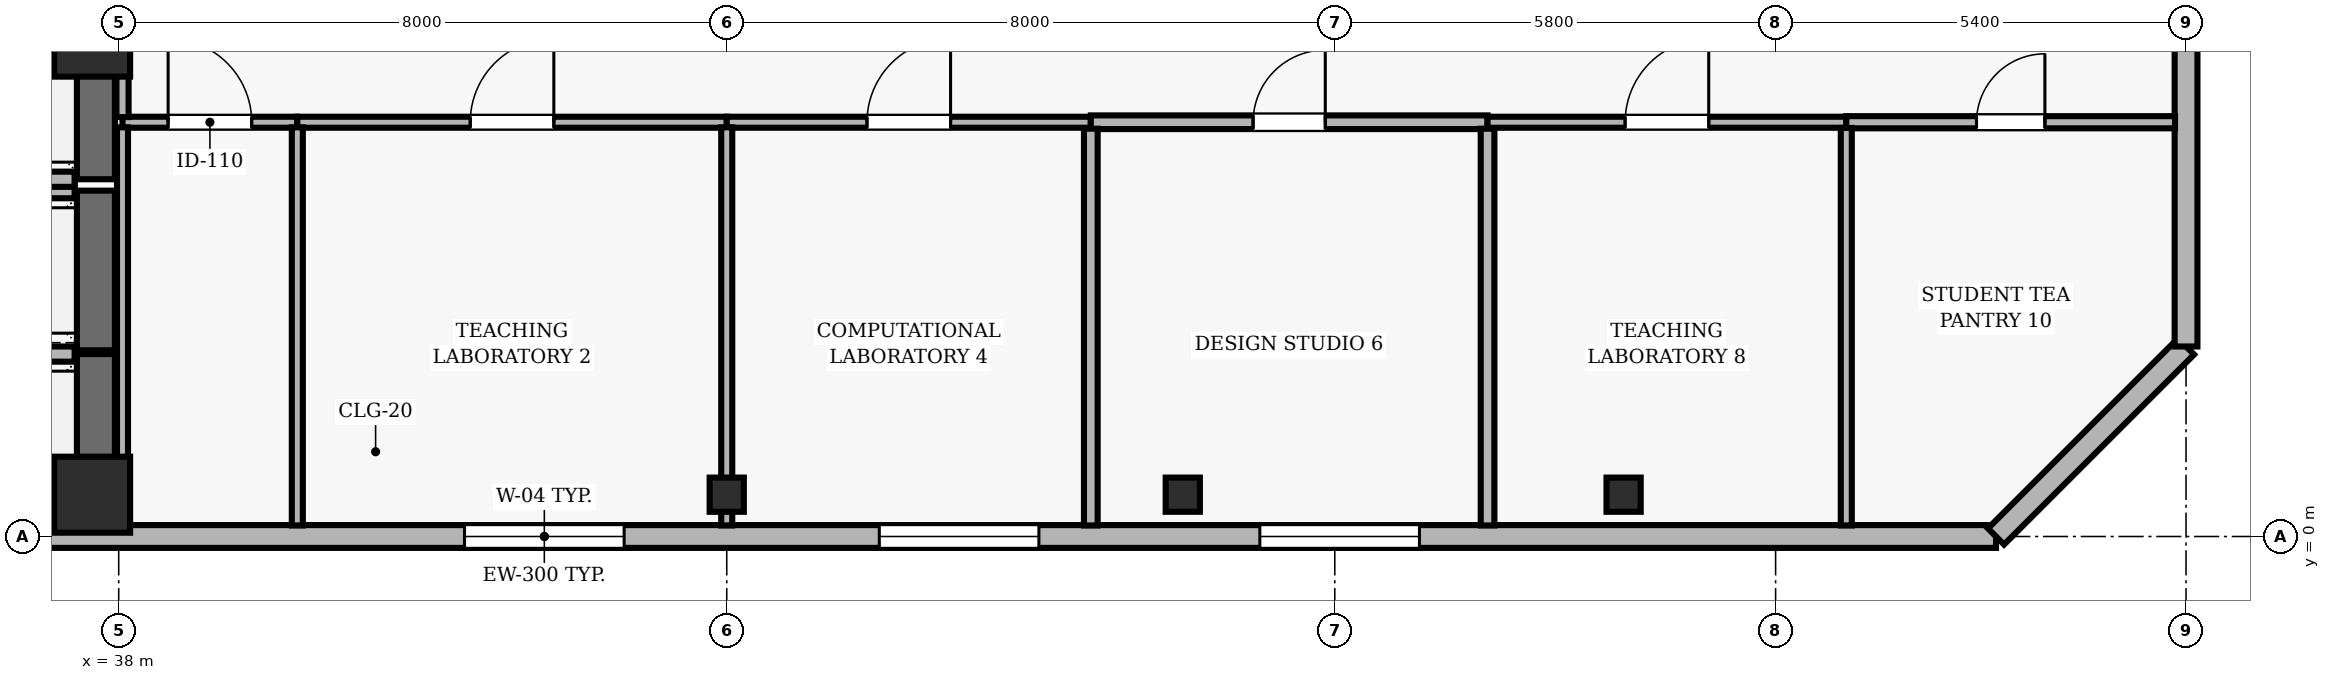
"""IFC4 building model, lengths in metres.
Left out: names, types, materials, properties, quantities, classifications, styles, units other than length and angle.
Written with IfcOpenShell. Run it as: python <this file> out.ifc"""

import sys

from ifc_helpers import new_model, si_unit, direction, frame, frame_2d, origin, origin_2d, place, context, subcontext, project, spatial, rectangle, hollow_rectangle, extrude, element, fill, save


model = new_model("IFC4")
c1 = context("Model", 3, precision=1e-05, world=origin(), true_north=direction((0.0, 1.0)))
c2 = subcontext(c1, "Body", "Model", "MODEL_VIEW")
j1 = project(units=[si_unit("LENGTHUNIT", "METRE"), si_unit("PLANEANGLEUNIT", "RADIAN")], contexts=[c1])
p1 = place(None, origin())
s1 = spatial("IfcSite", under=j1, at=p1, CompositionType="ELEMENT")
p2 = place(p1, origin())
s2 = spatial("IfcBuilding", under=s1, at=p2, CompositionType="ELEMENT")
p3 = place(p2, frame((0.0, 0.0, 210.9)))
s3 = spatial("IfcBuildingStorey", under=s2, at=p3, CompositionType="ELEMENT", Elevation=210.9)
for number, where, z_axis, x_axis in (
    (1, (37.65, 0.55, 0.0), (0.0, 0.0, 1.0), (1.0, 0.0, 0.0)),
    (2, (37.65, 6.55, 0.0), (0.0, 0.0, 1.0), (1.0, 0.0, 0.0)),
):
    element("IfcColumn", number, at=place(p3, frame(where, z_axis=z_axis, x_axis=x_axis)), inside=s3, PredefinedType="COLUMN", context=c2, shape_type="SweptSolid", body=[
        extrude(rectangle(XDim=1.0, YDim=1.0, at=origin_2d()), origin(), (0.0, 0.0, 1.0), 3.9),
    ])
for number, where, z_axis, x_axis in (
    (3, (46.0, 0.55, 0.0), (0.0, 0.0, 1.0), (1.0, 0.0, 0.0)),
    (4, (52.0, 0.55, 0.0), (0.0, 0.0, 1.0), (1.0, 0.0, 0.0)),
    (5, (57.8, 0.55, 0.0), (0.0, 0.0, 1.0), (1.0, 0.0, 0.0)),
):
    element("IfcColumn", number, at=place(p3, frame(where, z_axis=z_axis, x_axis=x_axis)), inside=s3, PredefinedType="COLUMN", context=c2, shape_type="SweptSolid", body=[
        extrude(hollow_rectangle(XDim=0.45, YDim=0.45, WallThickness=0.02, at=origin_2d()), origin(), (0.0, 0.0, 1.0), 3.9),
    ])
p4 = place(p3, frame((24.5, 0.0, 0.0), z_axis=(0.0, 0.0, 1.0), x_axis=(1.0, 0.0, 0.0)))
e6 = element("IfcWall", 6, at=p4, inside=s3, PredefinedType="SOLIDWALL", context=c2, shape_type="SweptSolid", body=[
    extrude(rectangle(XDim=38.2, YDim=0.3, at=frame_2d((19.1, 0.0))), origin(), (0.0, 0.0, 1.0), 3.69),
])
p5 = place(p4, frame((1.679, 0.0, 0.9)))
e7 = element("IfcOpeningElement", 7, at=p5, cuts=e6, PredefinedType="OPENING", context=c2, shape_type="SweptSolid", body=[
    extrude(rectangle(XDim=2.1, YDim=1.6, at=frame_2d((1.05, 0.8))), frame((0.0, 0.16, 0.0), z_axis=(0.0, -1.0, 0.0), x_axis=(1.0, 0.0, 0.0)), (0.0, 0.0, 1.0), 0.32),
])
p6 = place(p4, frame((18.05, 0.0, 0.9)))
e8 = element("IfcOpeningElement", 8, at=p6, cuts=e6, PredefinedType="OPENING", context=c2, shape_type="SweptSolid", body=[
    extrude(rectangle(XDim=2.1, YDim=1.6, at=frame_2d((1.05, 0.8))), frame((0.0, 0.16, 0.0), z_axis=(0.0, -1.0, 0.0), x_axis=(1.0, 0.0, 0.0)), (0.0, 0.0, 1.0), 0.32),
])
p7 = place(p4, frame((23.507, 0.0, 0.9)))
e9 = element("IfcOpeningElement", 9, at=p7, cuts=e6, PredefinedType="OPENING", context=c2, shape_type="SweptSolid", body=[
    extrude(rectangle(XDim=2.1, YDim=1.6, at=frame_2d((1.05, 0.8))), frame((0.0, 0.16, 0.0), z_axis=(0.0, -1.0, 0.0), x_axis=(1.0, 0.0, 0.0)), (0.0, 0.0, 1.0), 0.32),
])
p8 = place(p4, frame((28.514, 0.0, 0.9)))
e10 = element("IfcOpeningElement", 10, at=p8, cuts=e6, PredefinedType="OPENING", context=c2, shape_type="SweptSolid", body=[
    extrude(rectangle(XDim=2.1, YDim=1.6, at=frame_2d((1.05, 0.8))), frame((0.0, 0.16, 0.0), z_axis=(0.0, -1.0, 0.0), x_axis=(1.0, 0.0, 0.0)), (0.0, 0.0, 1.0), 0.32),
])
p9 = place(p3, frame((62.7, 0.0, 0.0), z_axis=(0.0, 0.0, 1.0), x_axis=(0.707106781187, 0.707106781187, 0.0)))
e11 = element("IfcWall", 11, at=p9, inside=s3, PredefinedType="SOLIDWALL", context=c2, shape_type="SweptSolid", body=[
    extrude(rectangle(XDim=3.536, YDim=0.3, at=frame_2d((1.768, 0.0))), origin(), (0.0, 0.0, 1.0), 3.69),
])
p10 = place(p3, frame((65.2, 2.5, 0.0), z_axis=(0.0, 0.0, 1.0), x_axis=(0.0, 1.0, 0.0)))
e12 = element("IfcWall", 12, at=p10, inside=s3, PredefinedType="SOLIDWALL", context=c2, shape_type="SweptSolid", body=[
    extrude(rectangle(XDim=11.0, YDim=0.3, at=frame_2d((5.5, 0.0))), origin(), (0.0, 0.0, 1.0), 3.69),
])
p11 = place(p10, frame((7.5, 0.0, 0.9)))
e13 = element("IfcOpeningElement", 13, at=p11, cuts=e12, PredefinedType="OPENING", context=c2, shape_type="SweptSolid", body=[
    extrude(rectangle(XDim=1.5, YDim=1.8, at=frame_2d((0.75, 0.9))), frame((0.0, 0.16, 0.0), z_axis=(0.0, -1.0, 0.0), x_axis=(1.0, 0.0, 0.0)), (0.0, 0.0, 1.0), 0.32),
])
p12 = place(p3, frame((37.7, 0.3, 0.0), z_axis=(0.0, 0.0, 1.0), x_axis=(0.0, 1.0, 0.0)))
e14 = element("IfcWall", 14, at=p12, inside=s3, PredefinedType="SHEAR", context=c2, shape_type="SweptSolid", body=[
    extrude(rectangle(XDim=2.1, YDim=0.5, at=frame_2d((1.05, 0.0))), origin(), (0.0, 0.0, 1.0), 3.69),
])
for number, where, z_axis, x_axis in (
    (15, (35.28, 0.3, 0.0), (0.0, 0.0, 1.0), (1.0, 0.0, 0.0)),
    (16, (37.42, 2.4, 0.0), (0.0, 0.0, 1.0), (-1.0, 0.0, 0.0)),
):
    element("IfcWall", number, at=place(p3, frame(where, z_axis=z_axis, x_axis=x_axis)), inside=s3, PredefinedType="SOLIDWALL", context=c2, shape_type="SweptSolid", body=[
        extrude(rectangle(XDim=2.14, YDim=0.2, at=frame_2d((1.07, 0.0))), origin(), (0.0, 0.0, 1.0), 3.69),
    ])
p13 = place(p3, frame((37.7, 2.45, 0.0), z_axis=(0.0, 0.0, 1.0), x_axis=(0.0, 1.0, 0.0)))
e17 = element("IfcWall", 17, at=p13, inside=s3, PredefinedType="SHEAR", context=c2, shape_type="SweptSolid", body=[
    extrude(rectangle(XDim=2.1, YDim=0.5, at=frame_2d((1.05, 0.0))), origin(), (0.0, 0.0, 1.0), 3.69),
])
p14 = place(p3, frame((37.42, 4.55, 0.0), z_axis=(0.0, 0.0, 1.0), x_axis=(-1.0, 0.0, 0.0)))
e18 = element("IfcWall", 18, at=p14, inside=s3, PredefinedType="SOLIDWALL", context=c2, shape_type="SweptSolid", body=[
    extrude(rectangle(XDim=2.14, YDim=0.2, at=frame_2d((1.07, 0.0))), origin(), (0.0, 0.0, 1.0), 3.69),
])
p15 = place(p3, frame((37.7, 4.7, 0.0), z_axis=(0.0, 0.0, 1.0), x_axis=(0.0, 1.0, 0.0)))
e19 = element("IfcWall", 19, at=p15, inside=s3, PredefinedType="SHEAR", context=c2, shape_type="SweptSolid", body=[
    extrude(rectangle(XDim=2.25, YDim=0.5, at=frame_2d((1.125, 0.0))), origin(), (0.0, 0.0, 1.0), 3.69),
])
p16 = place(p3, frame((35.28, 4.7, 0.0), z_axis=(0.0, 0.0, 1.0), x_axis=(1.0, 0.0, 0.0)))
e20 = element("IfcWall", 20, at=p16, inside=s3, PredefinedType="SOLIDWALL", context=c2, shape_type="SweptSolid", body=[
    extrude(rectangle(XDim=2.14, YDim=0.2, at=frame_2d((1.07, 0.0))), origin(), (0.0, 0.0, 1.0), 3.69),
])
p17 = place(p3, frame((38.05, 5.45, 0.0), z_axis=(0.0, 0.0, 1.0), x_axis=(1.0, 0.0, 0.0)))
e21 = element("IfcWall", 21, at=p17, inside=s3, PredefinedType="PARTITIONING", context=c2, shape_type="SweptSolid", body=[
    extrude(rectangle(XDim=2.3, YDim=0.145, at=frame_2d((1.15, 0.0))), origin(), (0.0, 0.0, 1.0), 3.372),
])
p18 = place(p17, frame((0.6, 0.0, 0.0)))
e22 = element("IfcOpeningElement", 22, at=p18, cuts=e21, PredefinedType="OPENING", context=c2, shape_type="SweptSolid", body=[
    extrude(rectangle(XDim=1.1, YDim=2.15, at=frame_2d((0.55, 1.075))), frame((0.0, 0.083, 0.0), z_axis=(0.0, -1.0, 0.0), x_axis=(1.0, 0.0, 0.0)), (0.0, 0.0, 1.0), 0.165),
])
p19 = place(p3, frame((40.35, 5.45, 0.0), z_axis=(0.0, 0.0, 1.0), x_axis=(1.0, 0.0, 0.0)))
e23 = element("IfcWall", 23, at=p19, inside=s3, PredefinedType="PARTITIONING", context=c2, shape_type="SweptSolid", body=[
    extrude(rectangle(XDim=5.65, YDim=0.145, at=frame_2d((2.825, 0.0))), origin(), (0.0, 0.0, 1.0), 3.372),
])
p20 = place(p19, frame((2.275, 0.0, 0.0)))
e24 = element("IfcOpeningElement", 24, at=p20, cuts=e23, PredefinedType="OPENING", context=c2, shape_type="SweptSolid", body=[
    extrude(rectangle(XDim=1.1, YDim=2.15, at=frame_2d((0.55, 1.075))), frame((0.0, 0.083, 0.0), z_axis=(0.0, -1.0, 0.0), x_axis=(1.0, 0.0, 0.0)), (0.0, 0.0, 1.0), 0.165),
])
p21 = place(p3, frame((46.0, 5.45, 0.0), z_axis=(0.0, 0.0, 1.0), x_axis=(1.0, 0.0, 0.0)))
e25 = element("IfcWall", 25, at=p21, inside=s3, PredefinedType="PARTITIONING", context=c2, shape_type="SweptSolid", body=[
    extrude(rectangle(XDim=4.79, YDim=0.145, at=frame_2d((2.395, 0.0))), origin(), (0.0, 0.0, 1.0), 3.372),
])
p22 = place(p21, frame((1.845, 0.0, 0.0)))
e26 = element("IfcOpeningElement", 26, at=p22, cuts=e25, PredefinedType="OPENING", context=c2, shape_type="SweptSolid", body=[
    extrude(rectangle(XDim=1.1, YDim=2.15, at=frame_2d((0.55, 1.075))), frame((0.0, 0.083, 0.0), z_axis=(0.0, -1.0, 0.0), x_axis=(1.0, 0.0, 0.0)), (0.0, 0.0, 1.0), 0.165),
])
p23 = place(p3, frame((50.79, 5.45, 0.0), z_axis=(0.0, 0.0, 1.0), x_axis=(1.0, 0.0, 0.0)))
e27 = element("IfcWall", 27, at=p23, inside=s3, PredefinedType="PARTITIONING", context=c2, shape_type="SweptSolid", body=[
    extrude(rectangle(XDim=5.22, YDim=0.18, at=frame_2d((2.61, 0.0))), origin(), (0.0, 0.0, 1.0), 3.372),
])
p24 = place(p23, frame((2.135, 0.0, 0.0)))
e28 = element("IfcOpeningElement", 28, at=p24, cuts=e27, PredefinedType="OPENING", context=c2, shape_type="SweptSolid", body=[
    extrude(rectangle(XDim=0.95, YDim=2.1, at=frame_2d((0.475, 1.05))), frame((0.0, 0.1, 0.0), z_axis=(0.0, -1.0, 0.0), x_axis=(1.0, 0.0, 0.0)), (0.0, 0.0, 1.0), 0.2),
])
p25 = place(p3, frame((56.01, 5.45, 0.0), z_axis=(0.0, 0.0, 1.0), x_axis=(1.0, 0.0, 0.0)))
e29 = element("IfcWall", 29, at=p25, inside=s3, PredefinedType="PARTITIONING", context=c2, shape_type="SweptSolid", body=[
    extrude(rectangle(XDim=4.72, YDim=0.145, at=frame_2d((2.36, 0.0))), origin(), (0.0, 0.0, 1.0), 3.372),
])
p26 = place(p25, frame((1.81, 0.0, 0.0)))
e30 = element("IfcOpeningElement", 30, at=p26, cuts=e29, PredefinedType="OPENING", context=c2, shape_type="SweptSolid", body=[
    extrude(rectangle(XDim=1.1, YDim=2.15, at=frame_2d((0.55, 1.075))), frame((0.0, 0.083, 0.0), z_axis=(0.0, -1.0, 0.0), x_axis=(1.0, 0.0, 0.0)), (0.0, 0.0, 1.0), 0.165),
])
p27 = place(p3, frame((60.73, 5.45, 0.0), z_axis=(0.0, 0.0, 1.0), x_axis=(1.0, 0.0, 0.0)))
e31 = element("IfcWall", 31, at=p27, inside=s3, PredefinedType="PARTITIONING", context=c2, shape_type="SweptSolid", body=[
    extrude(rectangle(XDim=4.325, YDim=0.16, at=frame_2d((2.163, 0.0))), origin(), (0.0, 0.0, 1.0), 3.69),
])
p28 = place(p27, frame((1.713, 0.0, 0.0)))
e32 = element("IfcOpeningElement", 32, at=p28, cuts=e31, PredefinedType="OPENING", context=c2, shape_type="SweptSolid", body=[
    extrude(rectangle(XDim=0.9, YDim=2.1, at=frame_2d((0.45, 1.05))), frame((0.0, 0.09, 0.0), z_axis=(0.0, -1.0, 0.0), x_axis=(1.0, 0.0, 0.0)), (0.0, 0.0, 1.0), 0.18),
])
p29 = place(p3, frame((38.05, 5.383, 0.0), z_axis=(0.0, 0.0, 1.0), x_axis=(0.0, -1.0, 0.0)))
e33 = element("IfcWall", 33, at=p29, inside=s3, PredefinedType="PARTITIONING", context=c2, shape_type="SweptSolid", body=[
    extrude(rectangle(XDim=5.238, YDim=0.145, at=frame_2d((2.619, 0.0))), origin(), (0.0, 0.0, 1.0), 3.146),
])
p30 = place(p3, frame((38.05, 7.05, 0.0), z_axis=(0.0, 0.0, 1.0), x_axis=(0.0, -1.0, 0.0)))
e34 = element("IfcWall", 34, at=p30, inside=s3, PredefinedType="PARTITIONING", context=c2, shape_type="SweptSolid", body=[
    extrude(rectangle(XDim=1.532, YDim=0.16, at=frame_2d((0.766, 0.0))), origin(), (0.0, 0.0, 1.0), 3.146),
])
p31 = place(p3, frame((40.35, 0.145, 0.0), z_axis=(0.0, 0.0, 1.0), x_axis=(0.0, 1.0, 0.0)))
e35 = element("IfcWall", 35, at=p31, inside=s3, PredefinedType="PARTITIONING", context=c2, shape_type="SweptSolid", body=[
    extrude(rectangle(XDim=5.238, YDim=0.145, at=frame_2d((2.619, 0.0))), origin(), (0.0, 0.0, 1.0), 3.69),
])
p32 = place(p3, frame((46.0, 0.145, 0.0), z_axis=(0.0, 0.0, 1.0), x_axis=(0.0, 1.0, 0.0)))
e36 = element("IfcWall", 36, at=p32, inside=s3, PredefinedType="PARTITIONING", context=c2, shape_type="SweptSolid", body=[
    extrude(rectangle(XDim=5.238, YDim=0.145, at=frame_2d((2.619, 0.0))), origin(), (0.0, 0.0, 1.0), 3.146),
])
for number, where, z_axis, x_axis in (
    (37, (50.79, 0.145, 0.0), (0.0, 0.0, 1.0), (0.0, 1.0, 0.0)),
    (38, (56.01, 0.145, 0.0), (0.0, 0.0, 1.0), (0.0, 1.0, 0.0)),
):
    element("IfcWall", number, at=place(p3, frame(where, z_axis=z_axis, x_axis=x_axis)), inside=s3, PredefinedType="PARTITIONING", context=c2, shape_type="SweptSolid", body=[
        extrude(rectangle(XDim=5.22, YDim=0.18, at=frame_2d((2.61, 0.0))), origin(), (0.0, 0.0, 1.0), 3.69),
    ])
p33 = place(p3, frame((60.73, 0.145, 0.0), z_axis=(0.0, 0.0, 1.0), x_axis=(0.0, 1.0, 0.0)))
e39 = element("IfcWall", 39, at=p33, inside=s3, PredefinedType="PARTITIONING", context=c2, shape_type="SweptSolid", body=[
    extrude(rectangle(XDim=5.23, YDim=0.145, at=frame_2d((2.615, 0.0))), origin(), (0.0, 0.0, 1.0), 3.69),
])
p34 = place(p6, origin())
e40 = element("IfcWindow", 40, at=p34, inside=s3, PartitioningType="SINGLE_PANEL", PredefinedType="WINDOW", context=c2, shape_type="SweptSolid", body=[
    extrude(rectangle(XDim=2.1, YDim=1.6, at=frame_2d((1.05, 0.8))), frame((0.0, 0.03, 0.0), z_axis=(0.0, -1.0, 0.0), x_axis=(1.0, 0.0, 0.0)), (0.0, 0.0, 1.0), 0.06),
])
fill(e8, e40)
p35 = place(p7, origin())
e41 = element("IfcWindow", 41, at=p35, inside=s3, PartitioningType="SINGLE_PANEL", PredefinedType="WINDOW", context=c2, shape_type="SweptSolid", body=[
    extrude(rectangle(XDim=2.1, YDim=1.6, at=frame_2d((1.05, 0.8))), frame((0.0, 0.03, 0.0), z_axis=(0.0, -1.0, 0.0), x_axis=(1.0, 0.0, 0.0)), (0.0, 0.0, 1.0), 0.06),
])
fill(e9, e41)
p36 = place(p8, origin())
e42 = element("IfcWindow", 42, at=p36, inside=s3, PartitioningType="SINGLE_PANEL", PredefinedType="WINDOW", context=c2, shape_type="SweptSolid", body=[
    extrude(rectangle(XDim=2.1, YDim=1.6, at=frame_2d((1.05, 0.8))), frame((0.0, 0.03, 0.0), z_axis=(0.0, -1.0, 0.0), x_axis=(1.0, 0.0, 0.0)), (0.0, 0.0, 1.0), 0.06),
])
fill(e10, e42)
p37 = place(p18, origin())
e43 = element("IfcDoor", 43, at=p37, inside=s3, OperationType="SINGLE_SWING_LEFT", PredefinedType="DOOR", context=c2, shape_type="SweptSolid", body=[
    extrude(rectangle(XDim=1.1, YDim=2.15, at=frame_2d((0.55, 1.075))), frame((0.0, 0.025, 0.0), z_axis=(0.0, -1.0, 0.0), x_axis=(1.0, 0.0, 0.0)), (0.0, 0.0, 1.0), 0.05),
])
fill(e22, e43)
p38 = place(p20, origin())
e44 = element("IfcDoor", 44, at=p38, inside=s3, OperationType="SINGLE_SWING_RIGHT", PredefinedType="DOOR", context=c2, shape_type="SweptSolid", body=[
    extrude(rectangle(XDim=1.1, YDim=2.15, at=frame_2d((0.55, 1.075))), frame((0.0, 0.025, 0.0), z_axis=(0.0, -1.0, 0.0), x_axis=(1.0, 0.0, 0.0)), (0.0, 0.0, 1.0), 0.05),
])
fill(e24, e44)
p39 = place(p22, origin())
e45 = element("IfcDoor", 45, at=p39, inside=s3, OperationType="SINGLE_SWING_RIGHT", PredefinedType="DOOR", context=c2, shape_type="SweptSolid", body=[
    extrude(rectangle(XDim=1.1, YDim=2.15, at=frame_2d((0.55, 1.075))), frame((0.0, 0.025, 0.0), z_axis=(0.0, -1.0, 0.0), x_axis=(1.0, 0.0, 0.0)), (0.0, 0.0, 1.0), 0.05),
])
fill(e26, e45)
p40 = place(p24, origin())
e46 = element("IfcDoor", 46, at=p40, inside=s3, OperationType="SINGLE_SWING_RIGHT", PredefinedType="DOOR", context=c2, shape_type="SweptSolid", body=[
    extrude(rectangle(XDim=0.95, YDim=2.1, at=frame_2d((0.475, 1.05))), frame((0.0, 0.025, 0.0), z_axis=(0.0, -1.0, 0.0), x_axis=(1.0, 0.0, 0.0)), (0.0, 0.0, 1.0), 0.05),
])
fill(e28, e46)
p41 = place(p26, origin())
e47 = element("IfcDoor", 47, at=p41, inside=s3, OperationType="SINGLE_SWING_RIGHT", PredefinedType="DOOR", context=c2, shape_type="SweptSolid", body=[
    extrude(rectangle(XDim=1.1, YDim=2.15, at=frame_2d((0.55, 1.075))), frame((0.0, 0.025, 0.0), z_axis=(0.0, -1.0, 0.0), x_axis=(1.0, 0.0, 0.0)), (0.0, 0.0, 1.0), 0.05),
])
fill(e30, e47)
p42 = place(p28, origin())
e48 = element("IfcDoor", 48, at=p42, inside=s3, OperationType="SINGLE_SWING_RIGHT", PredefinedType="DOOR", context=c2, shape_type="SweptSolid", body=[
    extrude(rectangle(XDim=0.9, YDim=2.1, at=frame_2d((0.45, 1.05))), frame((0.0, 0.025, 0.0), z_axis=(0.0, -1.0, 0.0), x_axis=(1.0, 0.0, 0.0)), (0.0, 0.0, 1.0), 0.05),
])
fill(e32, e48)
save(model, sys.argv[1])
